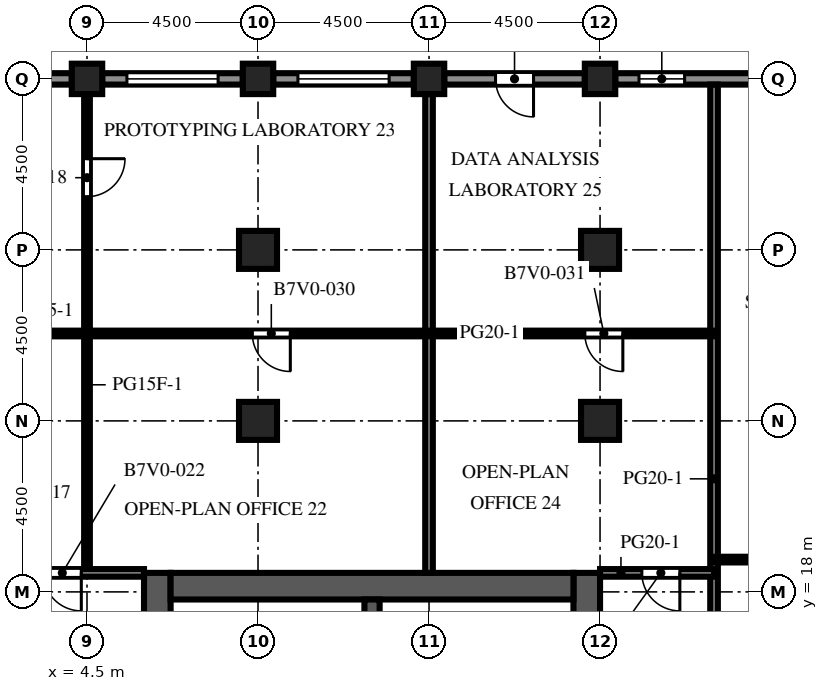
"""IFC4 building model, lengths in metres.
Left out: names, types, materials, properties, quantities, classifications, styles, units other than length and angle.
Written with IfcOpenShell. Run it as: python <this file> out.ifc"""

import sys

from ifc_helpers import new_model, si_unit, direction, frame, frame_2d, origin, origin_2d, place, context, subcontext, project, spatial, rectangle, extrude, element, fill, save


model = new_model("IFC4")
c1 = context("Model", 3, precision=1e-05, world=origin(), true_north=direction((0.0, 1.0)))
c2 = subcontext(c1, "Body", "Model", "MODEL_VIEW")
j1 = project(units=[si_unit("LENGTHUNIT", "METRE"), si_unit("PLANEANGLEUNIT", "RADIAN")], contexts=[c1])
p1 = place(None, origin())
s1 = spatial("IfcSite", under=j1, at=p1, CompositionType="ELEMENT")
p2 = place(p1, origin())
s2 = spatial("IfcBuilding", under=s1, at=p2, CompositionType="ELEMENT")
p3 = place(p2, frame((0.0, 0.0, 239.8)))
s3 = spatial("IfcBuildingStorey", under=s2, at=p3, CompositionType="ELEMENT", Elevation=239.8)
for number, where, z_axis, x_axis in (
    (1, (4.5, 31.5, 0.0), (0.0, 0.0, 1.0), (1.0, 0.0, 0.0)),
    (2, (9.0, 31.5, 0.0), (0.0, 0.0, 1.0), (1.0, 0.0, 0.0)),
    (3, (13.5, 31.5, 0.0), (0.0, 0.0, 1.0), (1.0, 0.0, 0.0)),
    (4, (18.0, 31.5, 0.0), (0.0, 0.0, 1.0), (1.0, 0.0, 0.0)),
):
    element("IfcColumn", number, at=place(p3, frame(where, z_axis=z_axis, x_axis=x_axis)), inside=s3, PredefinedType="COLUMN", context=c2, shape_type="SweptSolid", body=[
        extrude(rectangle(XDim=0.8, YDim=0.8, at=origin_2d()), origin(), (0.0, 0.0, 1.0), 4.1),
    ])
for number, where, z_axis, x_axis in (
    (5, (9.0, 22.5, 0.0), (0.0, 0.0, 1.0), (1.0, 0.0, 0.0)),
    (6, (9.0, 27.0, 0.0), (0.0, 0.0, 1.0), (1.0, 0.0, 0.0)),
    (7, (18.0, 22.5, 0.0), (0.0, 0.0, 1.0), (1.0, 0.0, 0.0)),
    (8, (18.0, 27.0, 0.0), (0.0, 0.0, 1.0), (1.0, 0.0, 0.0)),
):
    element("IfcColumn", number, at=place(p3, frame(where, z_axis=z_axis, x_axis=x_axis)), inside=s3, PredefinedType="COLUMN", context=c2, shape_type="SweptSolid", body=[
        extrude(rectangle(XDim=1.0, YDim=1.0, at=origin_2d()), origin(), (0.0, 0.0, 1.0), 4.1),
    ])
p4 = place(p3, frame((6.35, -9.0, 0.0), z_axis=(0.0, 0.0, 1.0), x_axis=(0.0, 1.0, 0.0)))
e9 = element("IfcWall", 9, at=p4, inside=s3, PredefinedType="SHEAR", context=c2, shape_type="SweptSolid", body=[
    extrude(rectangle(XDim=27.5, YDim=0.7, at=frame_2d((13.75, 0.0))), origin(), (0.0, 0.0, 1.0), 4.1),
])
p5 = place(p4, frame((12.55, 0.0, 0.0)))
e10 = element("IfcOpeningElement", 10, at=p5, cuts=e9, PredefinedType="OPENING", context=c2, shape_type="SweptSolid", body=[
    extrude(rectangle(XDim=2.4, YDim=2.4, at=frame_2d((1.2, 1.2))), frame((0.0, 0.36, 0.0), z_axis=(0.0, -1.0, 0.0), x_axis=(1.0, 0.0, 0.0)), (0.0, 0.0, 1.0), 0.72),
])
p6 = place(p4, frame((5.42, 0.0, 0.0)))
e11 = element("IfcOpeningElement", 11, at=p6, cuts=e9, PredefinedType="OPENING", context=c2, shape_type="SweptSolid", body=[
    extrude(rectangle(XDim=1.2, YDim=2.1, at=frame_2d((0.6, 1.05))), frame((0.0, 0.36, 0.0), z_axis=(0.0, -1.0, 0.0), x_axis=(1.0, 0.0, 0.0)), (0.0, 0.0, 1.0), 0.72),
])
p7 = place(p4, frame((19.46, 0.0, 0.0)))
e12 = element("IfcOpeningElement", 12, at=p7, cuts=e9, PredefinedType="OPENING", context=c2, shape_type="SweptSolid", body=[
    extrude(rectangle(XDim=1.0, YDim=2.1, at=frame_2d((0.5, 1.05))), frame((0.0, 0.36, 0.0), z_axis=(0.0, -1.0, 0.0), x_axis=(1.0, 0.0, 0.0)), (0.0, 0.0, 1.0), 0.72),
])
p8 = place(p4, frame((21.17, 0.0, 0.0)))
e13 = element("IfcOpeningElement", 13, at=p8, cuts=e9, PredefinedType="OPENING", context=c2, shape_type="SweptSolid", body=[
    extrude(rectangle(XDim=1.0, YDim=2.1, at=frame_2d((0.5, 1.05))), frame((0.0, 0.36, 0.0), z_axis=(0.0, -1.0, 0.0), x_axis=(1.0, 0.0, 0.0)), (0.0, 0.0, 1.0), 0.72),
])
p9 = place(p4, frame((23.26, 0.0, 0.0)))
e14 = element("IfcOpeningElement", 14, at=p9, cuts=e9, PredefinedType="OPENING", context=c2, shape_type="SweptSolid", body=[
    extrude(rectangle(XDim=1.0, YDim=2.1, at=frame_2d((0.5, 1.05))), frame((0.0, 0.36, 0.0), z_axis=(0.0, -1.0, 0.0), x_axis=(1.0, 0.0, 0.0)), (0.0, 0.0, 1.0), 0.72),
])
p10 = place(p4, frame((25.35, 0.0, 0.0)))
e15 = element("IfcOpeningElement", 15, at=p10, cuts=e9, PredefinedType="OPENING", context=c2, shape_type="SweptSolid", body=[
    extrude(rectangle(XDim=1.0, YDim=2.1, at=frame_2d((0.5, 1.05))), frame((0.0, 0.36, 0.0), z_axis=(0.0, -1.0, 0.0), x_axis=(1.0, 0.0, 0.0)), (0.0, 0.0, 1.0), 0.72),
])
p11 = place(p3, frame((17.65, -9.0, 0.0), z_axis=(0.0, 0.0, 1.0), x_axis=(0.0, 1.0, 0.0)))
e16 = element("IfcWall", 16, at=p11, inside=s3, PredefinedType="SHEAR", context=c2, shape_type="SweptSolid", body=[
    extrude(rectangle(XDim=27.5, YDim=0.7, at=frame_2d((13.75, 0.0))), origin(), (0.0, 0.0, 1.0), 4.1),
])
p12 = place(p11, frame((12.55, 0.0, 0.0)))
e17 = element("IfcOpeningElement", 17, at=p12, cuts=e16, PredefinedType="OPENING", context=c2, shape_type="SweptSolid", body=[
    extrude(rectangle(XDim=2.4, YDim=2.4, at=frame_2d((1.2, 1.2))), frame((0.0, 0.36, 0.0), z_axis=(0.0, -1.0, 0.0), x_axis=(1.0, 0.0, 0.0)), (0.0, 0.0, 1.0), 0.72),
])
p13 = place(p11, frame((6.825, 0.0, 0.0)))
e18 = element("IfcOpeningElement", 18, at=p13, cuts=e16, PredefinedType="OPENING", context=c2, shape_type="SweptSolid", body=[
    extrude(rectangle(XDim=1.2, YDim=2.1, at=frame_2d((0.6, 1.05))), frame((0.0, 0.36, 0.0), z_axis=(0.0, -1.0, 0.0), x_axis=(1.0, 0.0, 0.0)), (0.0, 0.0, 1.0), 0.72),
])
p14 = place(p11, frame((19.475, 0.0, 0.0)))
e19 = element("IfcOpeningElement", 19, at=p14, cuts=e16, PredefinedType="OPENING", context=c2, shape_type="SweptSolid", body=[
    extrude(rectangle(XDim=1.2, YDim=2.1, at=frame_2d((0.6, 1.05))), frame((0.0, 0.36, 0.0), z_axis=(0.0, -1.0, 0.0), x_axis=(1.0, 0.0, 0.0)), (0.0, 0.0, 1.0), 0.72),
])
p15 = place(p3, frame((6.7, 18.15, 0.0), z_axis=(0.0, 0.0, 1.0), x_axis=(1.0, 0.0, 0.0)))
e20 = element("IfcWall", 20, at=p15, inside=s3, PredefinedType="SHEAR", context=c2, shape_type="SweptSolid", body=[
    extrude(rectangle(XDim=10.6, YDim=0.7, at=frame_2d((5.3, 0.0))), origin(), (0.0, 0.0, 1.0), 4.1),
])
p16 = place(p3, frame((12.0, 10.2, 0.0), z_axis=(0.0, 0.0, 1.0), x_axis=(0.0, 1.0, 0.0)))
e21 = element("IfcWall", 21, at=p16, inside=s3, PredefinedType="SHEAR", context=c2, shape_type="SweptSolid", body=[
    extrude(rectangle(XDim=7.6, YDim=0.4, at=frame_2d((3.8, 0.0))), origin(), (0.0, 0.0, 1.0), 4.1),
])
p17 = place(p3, frame((18.4, 31.5, 0.0), z_axis=(0.0, 0.0, 1.0), x_axis=(1.0, 0.0, 0.0)))
e22 = element("IfcWall", 22, at=p17, inside=s3, PredefinedType="SOLIDWALL", context=c2, shape_type="SweptSolid", body=[
    extrude(rectangle(XDim=3.7, YDim=0.3, at=frame_2d((1.85, 0.0))), origin(), (0.0, 0.0, 1.0), 2.85),
])
p18 = place(p17, frame((0.625, 0.0, 0.8)))
e23 = element("IfcOpeningElement", 23, at=p18, cuts=e22, PredefinedType="OPENING", context=c2, shape_type="SweptSolid", body=[
    extrude(rectangle(XDim=1.2, YDim=1.7, at=frame_2d((0.6, 0.85))), frame((0.0, 0.16, 0.0), z_axis=(0.0, -1.0, 0.0), x_axis=(1.0, 0.0, 0.0)), (0.0, 0.0, 1.0), 0.32),
])
p19 = place(p3, frame((13.9, 31.5, 0.0), z_axis=(0.0, 0.0, 1.0), x_axis=(1.0, 0.0, 0.0)))
e24 = element("IfcWall", 24, at=p19, inside=s3, PredefinedType="SOLIDWALL", context=c2, shape_type="SweptSolid", body=[
    extrude(rectangle(XDim=3.7, YDim=0.3, at=frame_2d((1.85, 0.0))), origin(), (0.0, 0.0, 1.0), 2.85),
])
p20 = place(p19, frame((1.35, 0.0, 0.0)))
e25 = element("IfcOpeningElement", 25, at=p20, cuts=e24, PredefinedType="OPENING", context=c2, shape_type="SweptSolid", body=[
    extrude(rectangle(XDim=1.0, YDim=2.2, at=frame_2d((0.5, 1.1))), frame((0.0, 0.16, 0.0), z_axis=(0.0, -1.0, 0.0), x_axis=(1.0, 0.0, 0.0)), (0.0, 0.0, 1.0), 0.32),
])
p21 = place(p3, frame((9.4, 31.5, 0.0), z_axis=(0.0, 0.0, 1.0), x_axis=(1.0, 0.0, 0.0)))
e26 = element("IfcWall", 26, at=p21, inside=s3, PredefinedType="SOLIDWALL", context=c2, shape_type="SweptSolid", body=[
    extrude(rectangle(XDim=3.7, YDim=0.3, at=frame_2d((1.85, 0.0))), origin(), (0.0, 0.0, 1.0), 2.85),
])
p22 = place(p21, frame((0.65, 0.0, 0.8)))
e27 = element("IfcOpeningElement", 27, at=p22, cuts=e26, PredefinedType="OPENING", context=c2, shape_type="SweptSolid", body=[
    extrude(rectangle(XDim=2.4, YDim=1.7, at=frame_2d((1.2, 0.85))), frame((0.0, 0.16, 0.0), z_axis=(0.0, -1.0, 0.0), x_axis=(1.0, 0.0, 0.0)), (0.0, 0.0, 1.0), 0.32),
])
p23 = place(p3, frame((4.9, 31.5, 0.0), z_axis=(0.0, 0.0, 1.0), x_axis=(1.0, 0.0, 0.0)))
e28 = element("IfcWall", 28, at=p23, inside=s3, PredefinedType="SOLIDWALL", context=c2, shape_type="SweptSolid", body=[
    extrude(rectangle(XDim=3.7, YDim=0.3, at=frame_2d((1.85, 0.0))), origin(), (0.0, 0.0, 1.0), 2.85),
])
p24 = place(p23, frame((0.65, 0.0, 0.8)))
e29 = element("IfcOpeningElement", 29, at=p24, cuts=e28, PredefinedType="OPENING", context=c2, shape_type="SweptSolid", body=[
    extrude(rectangle(XDim=2.4, YDim=1.7, at=frame_2d((1.2, 0.85))), frame((0.0, 0.16, 0.0), z_axis=(0.0, -1.0, 0.0), x_axis=(1.0, 0.0, 0.0)), (0.0, 0.0, 1.0), 0.32),
])
p25 = place(p3, frame((0.4, 31.5, 0.0), z_axis=(0.0, 0.0, 1.0), x_axis=(1.0, 0.0, 0.0)))
e30 = element("IfcWall", 30, at=p25, inside=s3, PredefinedType="SOLIDWALL", context=c2, shape_type="SweptSolid", body=[
    extrude(rectangle(XDim=3.7, YDim=0.3, at=frame_2d((1.85, 0.0))), origin(), (0.0, 0.0, 1.0), 2.85),
])
p26 = place(p25, frame((0.65, 0.0, 0.8)))
e31 = element("IfcOpeningElement", 31, at=p26, cuts=e30, PredefinedType="OPENING", context=c2, shape_type="SweptSolid", body=[
    extrude(rectangle(XDim=2.4, YDim=1.7, at=frame_2d((1.2, 0.85))), frame((0.0, 0.16, 0.0), z_axis=(0.0, -1.0, 0.0), x_axis=(1.0, 0.0, 0.0)), (0.0, 0.0, 1.0), 0.32),
])
p27 = place(p3, frame((4.5, 31.1, 0.0), z_axis=(0.0, 0.0, 1.0), x_axis=(0.0, -1.0, 0.0)))
e32 = element("IfcWall", 32, at=p27, inside=s3, PredefinedType="PARTITIONING", context=c2, shape_type="SweptSolid", body=[
    extrude(rectangle(XDim=12.6, YDim=0.15, at=frame_2d((6.3, 0.0))), origin(), (0.0, 0.0, 1.0), 3.65),
])
p28 = place(p27, frame((1.7, 0.0, 0.0)))
e33 = element("IfcOpeningElement", 33, at=p28, cuts=e32, PredefinedType="OPENING", context=c2, shape_type="SweptSolid", body=[
    extrude(rectangle(XDim=1.0, YDim=2.1, at=frame_2d((0.5, 1.05))), frame((0.0, 0.085, 0.0), z_axis=(0.0, -1.0, 0.0), x_axis=(1.0, 0.0, 0.0)), (0.0, 0.0, 1.0), 0.17),
])
p29 = place(p3, frame((13.5, 18.5, 0.0), z_axis=(0.0, 0.0, 1.0), x_axis=(0.0, 1.0, 0.0)))
e34 = element("IfcWall", 34, at=p29, inside=s3, PredefinedType="PARTITIONING", context=c2, shape_type="SweptSolid", body=[
    extrude(rectangle(XDim=12.6, YDim=0.2, at=frame_2d((6.3, 0.0))), origin(), (0.0, 0.0, 1.0), 3.65),
])
p30 = place(p3, frame((21.0, 31.35, 0.0), z_axis=(0.0, 0.0, 1.0), x_axis=(0.0, -1.0, 0.0)))
e35 = element("IfcWall", 35, at=p30, inside=s3, PredefinedType="PARTITIONING", context=c2, shape_type="SweptSolid", body=[
    extrude(rectangle(XDim=25.1, YDim=0.2, at=frame_2d((12.55, 0.0))), origin(), (0.0, 0.0, 1.0), 3.65),
])
p31 = place(p30, frame((20.75, 0.0, 0.0)))
e36 = element("IfcOpeningElement", 36, at=p31, cuts=e35, PredefinedType="OPENING", context=c2, shape_type="SweptSolid", body=[
    extrude(rectangle(XDim=1.0, YDim=2.1, at=frame_2d((0.5, 1.05))), frame((0.0, 0.11, 0.0), z_axis=(0.0, -1.0, 0.0), x_axis=(1.0, 0.0, 0.0)), (0.0, 0.0, 1.0), 0.22),
])
p32 = place(p3, frame((1.5, 18.5, 0.0), z_axis=(0.0, 0.0, 1.0), x_axis=(1.0, 0.0, 0.0)))
e37 = element("IfcWall", 37, at=p32, inside=s3, PredefinedType="PARTITIONING", context=c2, shape_type="SweptSolid", body=[
    extrude(rectangle(XDim=4.5, YDim=0.2, at=frame_2d((2.25, 0.0))), origin(), (0.0, 0.0, 1.0), 3.65),
])
p33 = place(p32, frame((1.85, 0.0, 0.0)))
e38 = element("IfcOpeningElement", 38, at=p33, cuts=e37, PredefinedType="OPENING", context=c2, shape_type="SweptSolid", body=[
    extrude(rectangle(XDim=1.0, YDim=2.1, at=frame_2d((0.5, 1.05))), frame((0.0, 0.11, 0.0), z_axis=(0.0, -1.0, 0.0), x_axis=(1.0, 0.0, 0.0)), (0.0, 0.0, 1.0), 0.22),
])
p34 = place(p3, frame((18.0, 18.5, 0.0), z_axis=(0.0, 0.0, 1.0), x_axis=(1.0, 0.0, 0.0)))
e39 = element("IfcWall", 39, at=p34, inside=s3, PredefinedType="PARTITIONING", context=c2, shape_type="SweptSolid", body=[
    extrude(rectangle(XDim=3.0, YDim=0.2, at=frame_2d((1.5, 0.0))), origin(), (0.0, 0.0, 1.0), 3.65),
])
p35 = place(p34, frame((1.1, 0.0, 0.0)))
e40 = element("IfcOpeningElement", 40, at=p35, cuts=e39, PredefinedType="OPENING", context=c2, shape_type="SweptSolid", body=[
    extrude(rectangle(XDim=1.0, YDim=2.1, at=frame_2d((0.5, 1.05))), frame((0.0, 0.11, 0.0), z_axis=(0.0, -1.0, 0.0), x_axis=(1.0, 0.0, 0.0)), (0.0, 0.0, 1.0), 0.22),
])
p36 = place(p3, frame((21.0, 18.85, 0.0), z_axis=(0.0, 0.0, 1.0), x_axis=(1.0, 0.0, 0.0)))
e41 = element("IfcWall", 41, at=p36, inside=s3, PredefinedType="PARTITIONING", context=c2, shape_type="SweptSolid", body=[
    extrude(rectangle(XDim=5.85, YDim=0.15, at=frame_2d((2.925, 0.0))), origin(), (0.0, 0.0, 1.0), 3.65),
])
p37 = place(p36, frame((3.35, 0.0, 0.0)))
e42 = element("IfcOpeningElement", 42, at=p37, cuts=e41, PredefinedType="OPENING", context=c2, shape_type="SweptSolid", body=[
    extrude(rectangle(XDim=1.0, YDim=2.1, at=frame_2d((0.5, 1.05))), frame((0.0, 0.085, 0.0), z_axis=(0.0, -1.0, 0.0), x_axis=(1.0, 0.0, 0.0)), (0.0, 0.0, 1.0), 0.17),
])
p38 = place(p3, frame((-13.5, 24.8, 0.0), z_axis=(0.0, 0.0, 1.0), x_axis=(1.0, 0.0, 0.0)))
e43 = element("IfcWall", 43, at=p38, inside=s3, PredefinedType="PARTITIONING", context=c2, shape_type="SweptSolid", body=[
    extrude(rectangle(XDim=34.5, YDim=0.15, at=frame_2d((17.25, 0.0))), origin(), (0.0, 0.0, 1.0), 3.65),
])
p39 = place(p38, frame((1.6, 0.0, 0.0)))
e44 = element("IfcOpeningElement", 44, at=p39, cuts=e43, PredefinedType="OPENING", context=c2, shape_type="SweptSolid", body=[
    extrude(rectangle(XDim=1.0, YDim=2.1, at=frame_2d((0.5, 1.05))), frame((0.0, 0.085, 0.0), z_axis=(0.0, -1.0, 0.0), x_axis=(1.0, 0.0, 0.0)), (0.0, 0.0, 1.0), 0.17),
])
p40 = place(p38, frame((10.35, 0.0, 0.0)))
e45 = element("IfcOpeningElement", 45, at=p40, cuts=e43, PredefinedType="OPENING", context=c2, shape_type="SweptSolid", body=[
    extrude(rectangle(XDim=1.0, YDim=2.1, at=frame_2d((0.5, 1.05))), frame((0.0, 0.085, 0.0), z_axis=(0.0, -1.0, 0.0), x_axis=(1.0, 0.0, 0.0)), (0.0, 0.0, 1.0), 0.17),
])
p41 = place(p38, frame((22.35, 0.0, 0.0)))
e46 = element("IfcOpeningElement", 46, at=p41, cuts=e43, PredefinedType="OPENING", context=c2, shape_type="SweptSolid", body=[
    extrude(rectangle(XDim=1.0, YDim=2.1, at=frame_2d((0.5, 1.05))), frame((0.0, 0.085, 0.0), z_axis=(0.0, -1.0, 0.0), x_axis=(1.0, 0.0, 0.0)), (0.0, 0.0, 1.0), 0.17),
])
p42 = place(p38, frame((31.1, 0.0, 0.0)))
e47 = element("IfcOpeningElement", 47, at=p42, cuts=e43, PredefinedType="OPENING", context=c2, shape_type="SweptSolid", body=[
    extrude(rectangle(XDim=1.0, YDim=2.1, at=frame_2d((0.5, 1.05))), frame((0.0, 0.085, 0.0), z_axis=(0.0, -1.0, 0.0), x_axis=(1.0, 0.0, 0.0)), (0.0, 0.0, 1.0), 0.17),
])
p43 = place(p18, origin())
e48 = element("IfcWindow", 48, at=p43, inside=s3, PartitioningType="SINGLE_PANEL", PredefinedType="WINDOW", context=c2, shape_type="SweptSolid", body=[
    extrude(rectangle(XDim=1.2, YDim=1.7, at=frame_2d((0.6, 0.85))), frame((0.0, 0.03, 0.0), z_axis=(0.0, -1.0, 0.0), x_axis=(1.0, 0.0, 0.0)), (0.0, 0.0, 1.0), 0.06),
])
fill(e23, e48)
p44 = place(p20, origin())
e49 = element("IfcDoor", 49, at=p44, inside=s3, OperationType="SINGLE_SWING_RIGHT", PredefinedType="DOOR", context=c2, shape_type="SweptSolid", body=[
    extrude(rectangle(XDim=1.0, YDim=2.2, at=frame_2d((0.5, 1.1))), frame((0.0, 0.025, 0.0), z_axis=(0.0, -1.0, 0.0), x_axis=(1.0, 0.0, 0.0)), (0.0, 0.0, 1.0), 0.05),
])
fill(e25, e49)
p45 = place(p22, origin())
e50 = element("IfcWindow", 50, at=p45, inside=s3, PartitioningType="SINGLE_PANEL", PredefinedType="WINDOW", context=c2, shape_type="SweptSolid", body=[
    extrude(rectangle(XDim=2.4, YDim=1.7, at=frame_2d((1.2, 0.85))), frame((0.0, 0.03, 0.0), z_axis=(0.0, -1.0, 0.0), x_axis=(1.0, 0.0, 0.0)), (0.0, 0.0, 1.0), 0.06),
])
fill(e27, e50)
p46 = place(p24, origin())
e51 = element("IfcWindow", 51, at=p46, inside=s3, PartitioningType="SINGLE_PANEL", PredefinedType="WINDOW", context=c2, shape_type="SweptSolid", body=[
    extrude(rectangle(XDim=2.4, YDim=1.7, at=frame_2d((1.2, 0.85))), frame((0.0, 0.03, 0.0), z_axis=(0.0, -1.0, 0.0), x_axis=(1.0, 0.0, 0.0)), (0.0, 0.0, 1.0), 0.06),
])
fill(e29, e51)
p47 = place(p28, origin())
e52 = element("IfcDoor", 52, at=p47, inside=s3, OperationType="SINGLE_SWING_LEFT", PredefinedType="DOOR", context=c2, shape_type="SweptSolid", body=[
    extrude(rectangle(XDim=1.0, YDim=2.1, at=frame_2d((0.5, 1.05))), frame((0.0, 0.025, 0.0), z_axis=(0.0, -1.0, 0.0), x_axis=(1.0, 0.0, 0.0)), (0.0, 0.0, 1.0), 0.05),
])
fill(e33, e52)
p48 = place(p33, origin())
e53 = element("IfcDoor", 53, at=p48, inside=s3, OperationType="SINGLE_SWING_RIGHT", PredefinedType="DOOR", context=c2, shape_type="SweptSolid", body=[
    extrude(rectangle(XDim=1.0, YDim=2.1, at=frame_2d((0.5, 1.05))), frame((0.0, 0.025, 0.0), z_axis=(0.0, -1.0, 0.0), x_axis=(1.0, 0.0, 0.0)), (0.0, 0.0, 1.0), 0.05),
])
fill(e38, e53)
p49 = place(p35, origin())
e54 = element("IfcDoor", 54, at=p49, inside=s3, OperationType="SINGLE_SWING_RIGHT", PredefinedType="DOOR", context=c2, shape_type="SweptSolid", body=[
    extrude(rectangle(XDim=1.0, YDim=2.1, at=frame_2d((0.5, 1.05))), frame((0.0, 0.025, 0.0), z_axis=(0.0, -1.0, 0.0), x_axis=(1.0, 0.0, 0.0)), (0.0, 0.0, 1.0), 0.05),
])
fill(e40, e54)
p50 = place(p41, origin())
e55 = element("IfcDoor", 55, at=p50, inside=s3, OperationType="SINGLE_SWING_RIGHT", PredefinedType="DOOR", context=c2, shape_type="SweptSolid", body=[
    extrude(rectangle(XDim=1.0, YDim=2.1, at=frame_2d((0.5, 1.05))), frame((0.0, 0.025, 0.0), z_axis=(0.0, -1.0, 0.0), x_axis=(1.0, 0.0, 0.0)), (0.0, 0.0, 1.0), 0.05),
])
fill(e46, e55)
p51 = place(p42, origin())
e56 = element("IfcDoor", 56, at=p51, inside=s3, OperationType="SINGLE_SWING_RIGHT", PredefinedType="DOOR", context=c2, shape_type="SweptSolid", body=[
    extrude(rectangle(XDim=1.0, YDim=2.1, at=frame_2d((0.5, 1.05))), frame((0.0, 0.025, 0.0), z_axis=(0.0, -1.0, 0.0), x_axis=(1.0, 0.0, 0.0)), (0.0, 0.0, 1.0), 0.05),
])
fill(e47, e56)
save(model, sys.argv[1])
